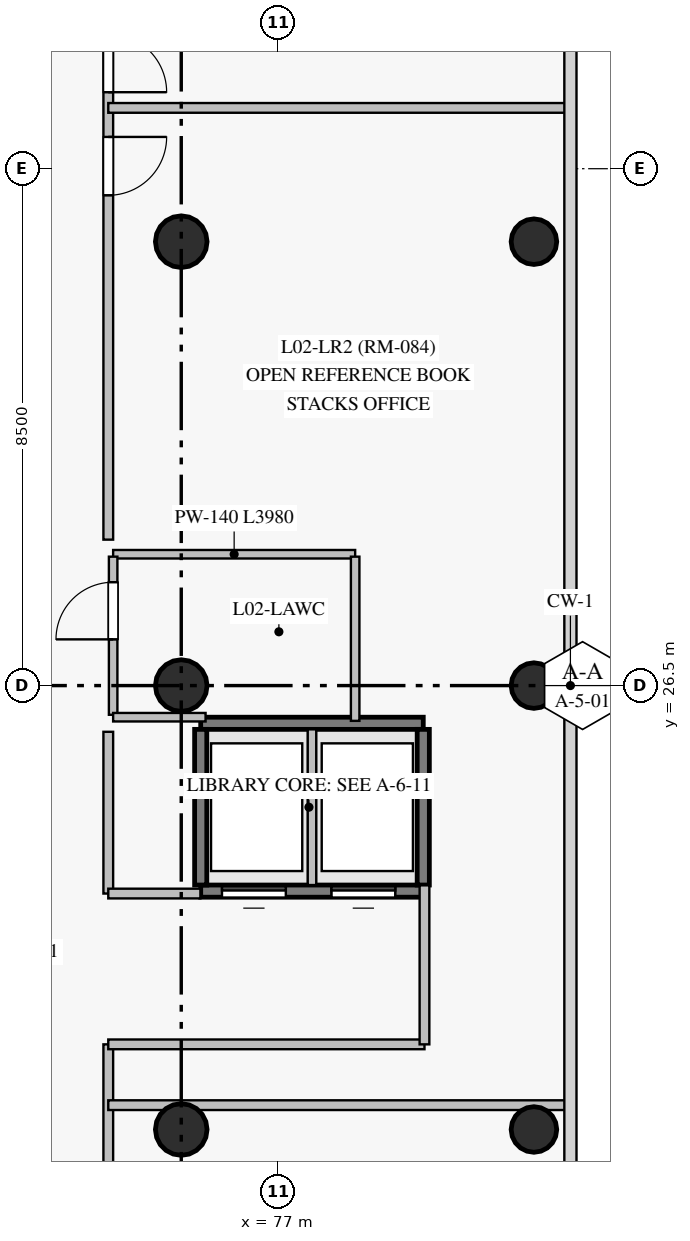
"""IFC4 building model, lengths in metres.
Left out: names, types, materials, properties, quantities, classifications, styles, units other than length and angle.
Written with IfcOpenShell. Run it as: python <this file> out.ifc"""

import sys

from ifc_helpers import new_model, si_unit, direction, frame, frame_2d, origin, origin_with_axes, origin_2d, place, context, subcontext, project, spatial, rectangle, circle, extrude, source, transform, mapped, element, fill, save


model = new_model("IFC4")
c1 = context("Model", 3, precision=1e-05, world=origin(), true_north=direction((0.0, 1.0)))
c2 = subcontext(c1, "Body", "Model", "MODEL_VIEW")
j1 = project(units=[si_unit("LENGTHUNIT", "METRE"), si_unit("PLANEANGLEUNIT", "RADIAN")], contexts=[c1])
p1 = place(None, origin())
s1 = spatial("IfcSite", under=j1, at=p1, CompositionType="ELEMENT")
p2 = place(p1, origin())
s2 = spatial("IfcBuilding", under=s1, at=p2, CompositionType="ELEMENT")
p3 = place(p2, frame((0.0, 0.0, 9.0)))
s3 = spatial("IfcBuildingStorey", under=s2, at=p3, CompositionType="ELEMENT", Elevation=9.0)
m1 = source(origin_with_axes(), c2, "Body", "SweptSolid", [
    extrude(circle(Radius=0.425, at=origin_2d()), origin(), (0.0, 0.0, 1.0), 4.5),
])
for number, where, z_axis, x_axis in (
    (1, (75.4, 19.2, 0.0), (0.0, 0.0, 1.0), (1.0, 0.0, 0.0)),
    (2, (75.4, 26.5, 0.0), (0.0, 0.0, 1.0), (1.0, 0.0, 0.0)),
    (3, (75.4, 33.8, 0.0), (0.0, 0.0, 1.0), (1.0, 0.0, 0.0)),
):
    element("IfcColumn", number, at=place(p3, frame(where, z_axis=z_axis, x_axis=x_axis)), inside=s3, PredefinedType="COLUMN", context=c2, shape_type="MappedRepresentation", body=[
        mapped(m1, transform((0.0, 0.0, 0.0), scale=1.0)),
    ])
m2 = source(origin_with_axes(), c2, "Body", "SweptSolid", [
    extrude(circle(Radius=0.375, at=origin_2d()), origin(), (0.0, 0.0, 1.0), 4.5),
])
for number, where, z_axis, x_axis in (
    (4, (81.2, 19.2, 0.0), (0.0, 0.0, 1.0), (1.0, 0.0, 0.0)),
    (5, (81.2, 26.5, 0.0), (0.0, 0.0, 1.0), (1.0, 0.0, 0.0)),
    (6, (81.2, 33.8, 0.0), (0.0, 0.0, 1.0), (1.0, 0.0, 0.0)),
):
    element("IfcColumn", number, at=place(p3, frame(where, z_axis=z_axis, x_axis=x_axis)), inside=s3, PredefinedType="COLUMN", context=c2, shape_type="MappedRepresentation", body=[
        mapped(m2, transform((0.0, 0.0, 0.0), scale=1.0)),
    ])
p4 = place(p3, frame((75.72, 23.12, 0.0), z_axis=(0.0, 0.0, 1.0), x_axis=(1.0, 0.0, 0.0)))
e7 = element("IfcWall", 7, at=p4, inside=s3, PredefinedType="SHEAR", context=c2, shape_type="SweptSolid", body=[
    extrude(rectangle(XDim=3.66, YDim=0.2, at=frame_2d((1.83, 0.0))), origin(), (0.0, 0.0, 1.0), 4.2),
])
p5 = place(p4, frame((0.35, 0.0, 0.0)))
e8 = element("IfcOpeningElement", 8, at=p5, cuts=e7, PredefinedType="OPENING", context=c2, shape_type="SweptSolid", body=[
    extrude(rectangle(XDim=1.05, YDim=2.15, at=frame_2d((0.525, 1.075))), frame((0.0, 0.11, 0.0), z_axis=(0.0, -1.0, 0.0), x_axis=(1.0, 0.0, 0.0)), (0.0, 0.0, 1.0), 0.22),
])
p6 = place(p4, frame((2.15, 0.0, 0.0)))
e9 = element("IfcOpeningElement", 9, at=p6, cuts=e7, PredefinedType="OPENING", context=c2, shape_type="SweptSolid", body=[
    extrude(rectangle(XDim=1.05, YDim=2.15, at=frame_2d((0.525, 1.075))), frame((0.0, 0.11, 0.0), z_axis=(0.0, -1.0, 0.0), x_axis=(1.0, 0.0, 0.0)), (0.0, 0.0, 1.0), 0.22),
])
p7 = place(p3, frame((75.72, 25.88, 0.0), z_axis=(0.0, 0.0, 1.0), x_axis=(1.0, 0.0, 0.0)))
e10 = element("IfcWall", 10, at=p7, inside=s3, PredefinedType="SHEAR", context=c2, shape_type="SweptSolid", body=[
    extrude(rectangle(XDim=3.66, YDim=0.2, at=frame_2d((1.83, 0.0))), origin(), (0.0, 0.0, 1.0), 4.2),
])
for number, where, z_axis, x_axis in (
    (11, (75.72, 23.22, 0.0), (0.0, 0.0, 1.0), (0.0, 1.0, 0.0)),
    (12, (79.38, 23.22, 0.0), (0.0, 0.0, 1.0), (0.0, 1.0, 0.0)),
):
    element("IfcWall", number, at=place(p3, frame(where, z_axis=z_axis, x_axis=x_axis)), inside=s3, PredefinedType="SHEAR", context=c2, shape_type="SweptSolid", body=[
        extrude(rectangle(XDim=2.56, YDim=0.2, at=frame_2d((1.28, 0.0))), origin(), (0.0, 0.0, 1.0), 4.2),
    ])
p8 = place(p3, frame((74.2, 44.038, 0.0), z_axis=(0.0, 0.0, 1.0), x_axis=(0.0, -1.0, 0.0)))
e13 = element("IfcWall", 13, at=p8, inside=s3, PredefinedType="PARTITIONING", context=c2, shape_type="SweptSolid", body=[
    extrude(rectangle(XDim=15.138, YDim=0.16, at=frame_2d((7.569, 0.0))), origin(), (0.0, 0.0, 1.0), 4.2),
])
p9 = place(p8, frame((8.515, 0.0, 0.0)))
e14 = element("IfcOpeningElement", 14, at=p9, cuts=e13, PredefinedType="OPENING", context=c2, shape_type="SweptSolid", body=[
    extrude(rectangle(XDim=0.96, YDim=2.15, at=frame_2d((0.48, 1.075))), frame((0.0, 0.09, 0.0), z_axis=(0.0, -1.0, 0.0), x_axis=(1.0, 0.0, 0.0)), (0.0, 0.0, 1.0), 0.18),
])
p10 = place(p8, frame((6.82, 0.0, 0.0)))
e15 = element("IfcOpeningElement", 15, at=p10, cuts=e13, PredefinedType="OPENING", context=c2, shape_type="SweptSolid", body=[
    extrude(rectangle(XDim=0.96, YDim=2.15, at=frame_2d((0.48, 1.075))), frame((0.0, 0.09, 0.0), z_axis=(0.0, -1.0, 0.0), x_axis=(1.0, 0.0, 0.0)), (0.0, 0.0, 1.0), 0.18),
])
p11 = place(p3, frame((74.2, 20.6, 0.0), z_axis=(0.0, 0.0, 1.0), x_axis=(0.0, -1.0, 0.0)))
e16 = element("IfcWall", 16, at=p11, inside=s3, PredefinedType="PARTITIONING", context=c2, shape_type="SweptSolid", body=[
    extrude(rectangle(XDim=11.678, YDim=0.16, at=frame_2d((5.839, 0.0))), origin(), (0.0, 0.0, 1.0), 4.2),
])
p12 = place(p3, frame((74.2, 19.6, 0.0), z_axis=(0.0, 0.0, 1.0), x_axis=(1.0, 0.0, 0.0)))
e17 = element("IfcWall", 17, at=p12, inside=s3, PredefinedType="PARTITIONING", context=c2, shape_type="SweptSolid", body=[
    extrude(rectangle(XDim=7.545, YDim=0.16, at=frame_2d((3.772, 0.0))), origin(), (0.0, 0.0, 1.0), 3.55),
])
p13 = place(p3, frame((74.2, 36.0, 0.0), z_axis=(0.0, 0.0, 1.0), x_axis=(1.0, 0.0, 0.0)))
e18 = element("IfcWall", 18, at=p13, inside=s3, PredefinedType="PARTITIONING", context=c2, shape_type="SweptSolid", body=[
    extrude(rectangle(XDim=7.545, YDim=0.16, at=frame_2d((3.772, 0.0))), origin(), (0.0, 0.0, 1.0), 4.2),
])
p14 = place(p3, frame((79.4, 20.6, 0.0), z_axis=(0.0, 0.0, 1.0), x_axis=(-1.0, 0.0, 0.0)))
e19 = element("IfcWall", 19, at=p14, inside=s3, PredefinedType="PARTITIONING", context=c2, shape_type="SweptSolid", body=[
    extrude(rectangle(XDim=5.2, YDim=0.16, at=frame_2d((2.6, 0.0))), origin(), (0.0, 0.0, 1.0), 4.2),
])
p15 = place(p3, frame((74.28, 28.66, 0.0), z_axis=(0.0, 0.0, 1.0), x_axis=(1.0, 0.0, 0.0)))
e20 = element("IfcWall", 20, at=p15, inside=s3, PredefinedType="PARTITIONING", context=c2, shape_type="SweptSolid", body=[
    extrude(rectangle(XDim=3.98, YDim=0.14, at=frame_2d((1.99, 0.0))), origin(), (0.0, 0.0, 1.0), 4.2),
])
p16 = place(p3, frame((78.26, 25.92, 0.0), z_axis=(0.0, 0.0, 1.0), x_axis=(0.0, 1.0, 0.0)))
e21 = element("IfcWall", 21, at=p16, inside=s3, PredefinedType="PARTITIONING", context=c2, shape_type="SweptSolid", body=[
    extrude(rectangle(XDim=2.7, YDim=0.14, at=frame_2d((1.35, 0.0))), origin(), (0.0, 0.0, 1.0), 4.2),
])
p17 = place(p3, frame((74.2, 25.74, 0.0), z_axis=(0.0, 0.0, 1.0), x_axis=(0.0, -1.0, 0.0)))
e22 = element("IfcWall", 22, at=p17, inside=s3, PredefinedType="PARTITIONING", context=c2, shape_type="SweptSolid", body=[
    extrude(rectangle(XDim=2.66, YDim=0.16, at=frame_2d((1.33, 0.0))), origin(), (0.0, 0.0, 1.0), 4.2),
])
p18 = place(p3, frame((74.28, 26.02, 0.0), z_axis=(0.0, 0.0, 1.0), x_axis=(0.0, 1.0, 0.0)))
e23 = element("IfcWall", 23, at=p18, inside=s3, PredefinedType="PARTITIONING", context=c2, shape_type="SweptSolid", body=[
    extrude(rectangle(XDim=2.6, YDim=0.14, at=frame_2d((1.3, 0.0))), origin(), (0.0, 0.0, 1.0), 4.2),
])
p19 = place(p18, frame((1.24, 0.0, 0.0)))
e24 = element("IfcOpeningElement", 24, at=p19, cuts=e23, PredefinedType="OPENING", context=c2, shape_type="SweptSolid", body=[
    extrude(rectangle(XDim=0.94, YDim=2.1, at=frame_2d((0.47, 1.05))), frame((0.0, 0.08, 0.0), z_axis=(0.0, -1.0, 0.0), x_axis=(1.0, 0.0, 0.0)), (0.0, 0.0, 1.0), 0.16),
])
p20 = place(p3, frame((77.55, 23.22, 0.0), z_axis=(0.0, 0.0, 1.0), x_axis=(0.0, 1.0, 0.0)))
e25 = element("IfcWall", 25, at=p20, inside=s3, PredefinedType="PARTITIONING", context=c2, shape_type="SweptSolid", body=[
    extrude(rectangle(XDim=2.56, YDim=0.14, at=frame_2d((1.28, 0.0))), origin(), (0.0, 0.0, 1.0), 4.2),
])
p21 = place(p3, frame((79.4, 23.215, 0.0), z_axis=(0.0, 0.0, 1.0), x_axis=(0.0, -1.0, 0.0)))
e26 = element("IfcWall", 26, at=p21, inside=s3, PredefinedType="PARTITIONING", context=c2, shape_type="SweptSolid", body=[
    extrude(rectangle(XDim=2.615, YDim=0.16, at=frame_2d((1.308, 0.0))), origin(), (0.0, 0.0, 1.0), 4.2),
])
p22 = place(p3, frame((74.28, 25.98, 0.0), z_axis=(0.0, 0.0, 1.0), x_axis=(1.0, 0.0, 0.0)))
e27 = element("IfcWall", 27, at=p22, inside=s3, PredefinedType="PARTITIONING", context=c2, shape_type="SweptSolid", body=[
    extrude(rectangle(XDim=1.52, YDim=0.14, at=frame_2d((0.76, 0.0))), origin(), (0.0, 0.0, 1.0), 3.55),
])
p23 = place(p3, frame((74.2, 23.08, 0.0), z_axis=(0.0, 0.0, 1.0), x_axis=(1.0, 0.0, 0.0)))
e28 = element("IfcWall", 28, at=p23, inside=s3, PredefinedType="PARTITIONING", context=c2, shape_type="SweptSolid", body=[
    extrude(rectangle(XDim=1.515, YDim=0.16, at=frame_2d((0.758, 0.0))), origin(), (0.0, 0.0, 1.0), 3.7),
])
m3 = source(origin_with_axes(), c2, "Body", "SweptSolid", [
    extrude(rectangle(XDim=1.05, YDim=2.15, at=frame_2d((0.525, 1.075))), frame((0.0, 0.025, 0.0), z_axis=(0.0, -1.0, 0.0), x_axis=(1.0, 0.0, 0.0)), (0.0, 0.0, 1.0), 0.05),
])
p24 = place(p5, origin())
e29 = element("IfcDoor", 29, at=p24, inside=s3, OperationType="SLIDING_TO_LEFT", PredefinedType="DOOR", context=c2, shape_type="MappedRepresentation", body=[
    mapped(m3, transform((0.0, 0.0, 0.0), scale=1.0)),
])
fill(e8, e29)
p25 = place(p6, origin())
e30 = element("IfcDoor", 30, at=p25, inside=s3, OperationType="SLIDING_TO_RIGHT", PredefinedType="DOOR", context=c2, shape_type="MappedRepresentation", body=[
    mapped(m3, transform((0.0, 0.0, 0.0), scale=1.0)),
])
fill(e9, e30)
m4 = source(origin_with_axes(), c2, "Body", "SweptSolid", [
    extrude(rectangle(XDim=0.94, YDim=2.1, at=frame_2d((0.47, 1.05))), frame((0.0, 0.025, 0.0), z_axis=(0.0, -1.0, 0.0), x_axis=(1.0, 0.0, 0.0)), (0.0, 0.0, 1.0), 0.05),
])
p26 = place(p19, origin())
e31 = element("IfcDoor", 31, at=p26, inside=s3, OperationType="SINGLE_SWING_LEFT", PredefinedType="DOOR", context=c2, shape_type="MappedRepresentation", body=[
    mapped(m4, transform((0.0, 0.0, 0.0), scale=1.0)),
])
fill(e24, e31)
m5 = source(origin_with_axes(), c2, "Body", "SweptSolid", [
    extrude(rectangle(XDim=0.96, YDim=2.15, at=frame_2d((0.48, 1.075))), frame((0.0, 0.025, 0.0), z_axis=(0.0, -1.0, 0.0), x_axis=(1.0, 0.0, 0.0)), (0.0, 0.0, 1.0), 0.05),
])
p27 = place(p9, origin())
e32 = element("IfcDoor", 32, at=p27, inside=s3, OperationType="SINGLE_SWING_LEFT", PredefinedType="DOOR", context=c2, shape_type="MappedRepresentation", body=[
    mapped(m5, transform((0.0, 0.0, 0.0), scale=1.0)),
])
fill(e14, e32)
p28 = place(p10, origin())
e33 = element("IfcDoor", 33, at=p28, inside=s3, OperationType="SINGLE_SWING_RIGHT", PredefinedType="DOOR", context=c2, shape_type="MappedRepresentation", body=[
    mapped(m5, transform((0.0, 0.0, 0.0), scale=1.0)),
])
fill(e15, e33)
save(model, sys.argv[1])
